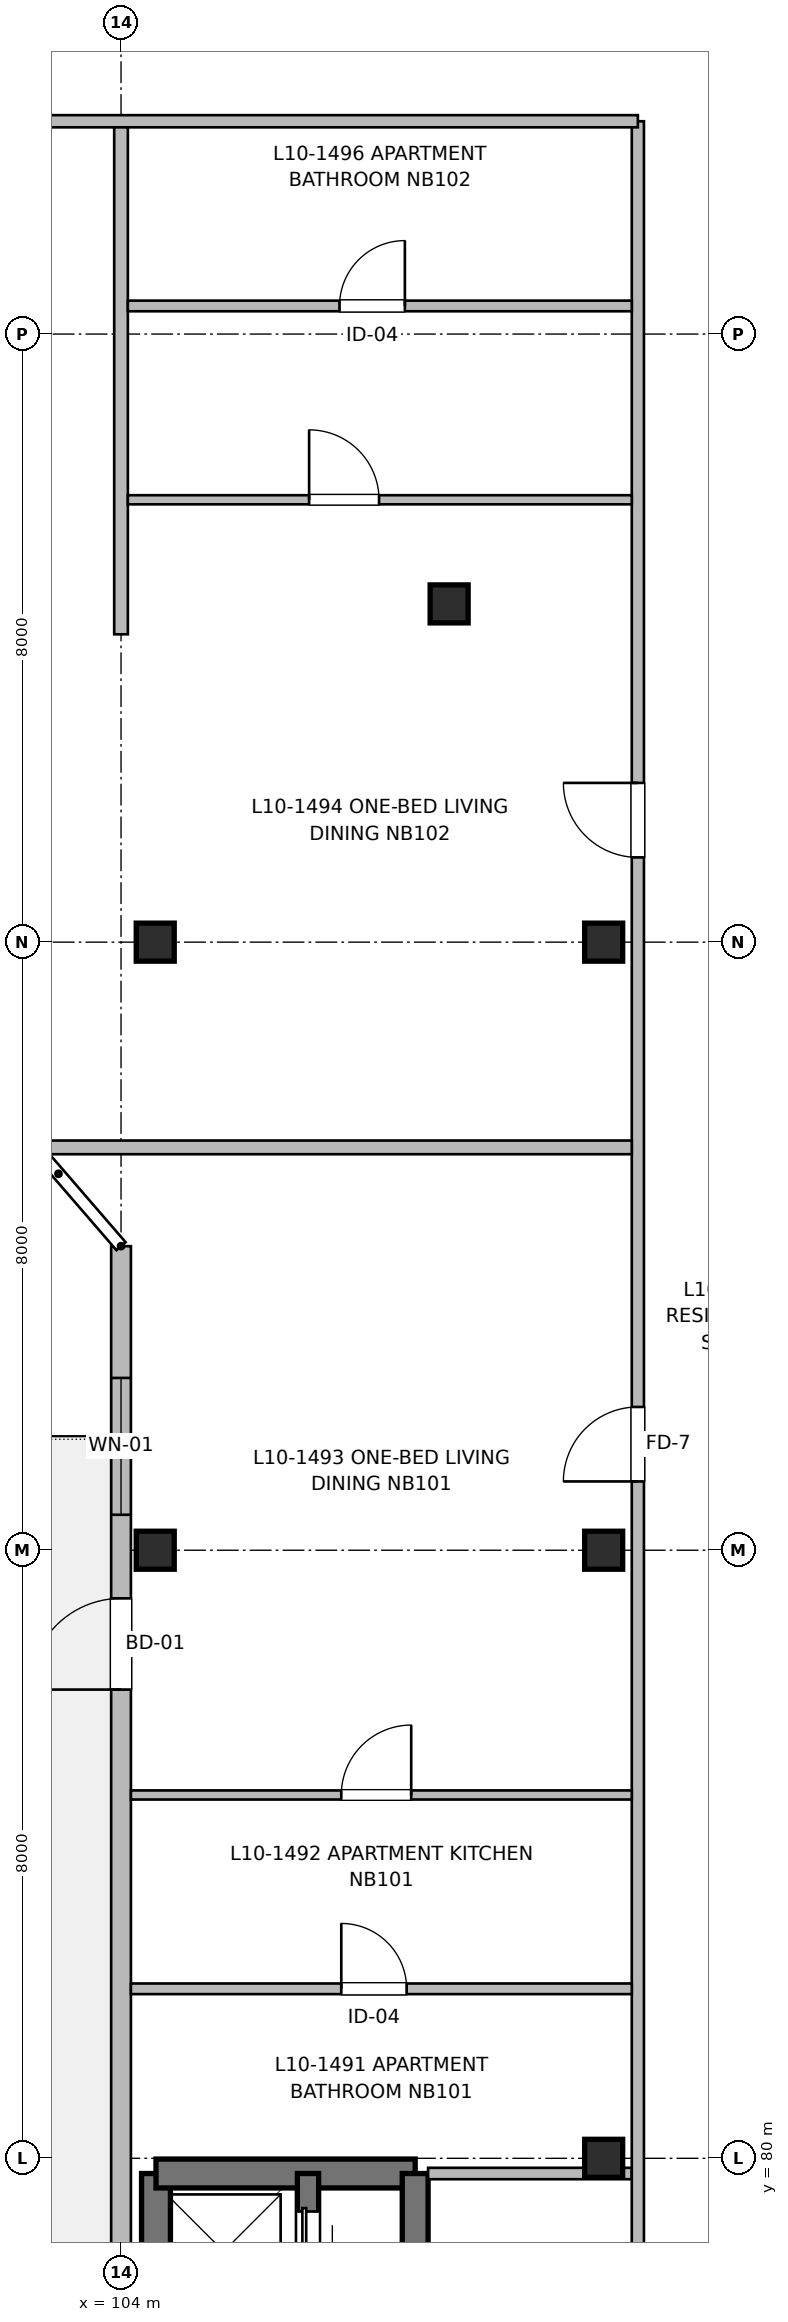
"""IFC4 building model, lengths in metres.
Left out: names, types, materials, properties, quantities, classifications, styles, units other than length and angle.
Written with IfcOpenShell. Run it as: python <this file> out.ifc"""

import sys

from ifc_helpers import new_model, si_unit, direction, frame, frame_2d, origin, origin_2d, place, context, subcontext, project, spatial, rectangle, extrude, element, fill, save


model = new_model("IFC4")
c1 = context("Model", 3, precision=1e-05, world=origin(), true_north=direction((0.0, 1.0)))
c2 = subcontext(c1, "Body", "Model", "MODEL_VIEW")
j1 = project(units=[si_unit("LENGTHUNIT", "METRE"), si_unit("PLANEANGLEUNIT", "RADIAN")], contexts=[c1])
p1 = place(None, origin())
s1 = spatial("IfcSite", under=j1, at=p1, CompositionType="ELEMENT")
p2 = place(p1, origin())
s2 = spatial("IfcBuilding", under=s1, at=p2, CompositionType="ELEMENT")
p3 = place(p2, frame((0.0, 0.0, 32.96)))
s3 = spatial("IfcBuildingStorey", under=s2, at=p3, CompositionType="ELEMENT", Elevation=32.96)
for number, where, z_axis, x_axis in (
    (1, (104.45, 88.0, 0.0), (0.0, 0.0, 1.0), (1.0, 0.0, 0.0)),
    (2, (104.45, 96.0, 0.0), (0.0, 0.0, 1.0), (1.0, 0.0, 0.0)),
    (3, (108.317, 100.45, 0.0), (0.0, 0.0, 1.0), (1.0, 0.0, 0.0)),
    (4, (110.35, 80.0, 0.0), (0.0, 0.0, 1.0), (1.0, 0.0, 0.0)),
    (5, (110.35, 88.0, 0.0), (0.0, 0.0, 1.0), (1.0, 0.0, 0.0)),
    (6, (110.35, 96.0, 0.0), (0.0, 0.0, 1.0), (1.0, 0.0, 0.0)),
):
    element("IfcColumn", number, at=place(p3, frame(where, z_axis=z_axis, x_axis=x_axis)), inside=s3, PredefinedType="COLUMN", context=c2, shape_type="SweptSolid", body=[
        extrude(rectangle(XDim=0.5, YDim=0.5, at=origin_2d()), origin(), (0.0, 0.0, 1.0), 3.2),
    ])
p4 = place(p3, frame((104.46, 67.35, 0.0), z_axis=(0.0, 0.0, 1.0), x_axis=(0.0, 1.0, 0.0)))
e7 = element("IfcWall", 7, at=p4, inside=s3, PredefinedType="SHEAR", context=c2, shape_type="SweptSolid", body=[
    extrude(rectangle(XDim=12.45, YDim=0.38, at=frame_2d((6.225, 0.0))), origin(), (0.0, 0.0, 1.0), 3.2),
])
p5 = place(p4, frame((2.2, 0.0, 0.97)))
e8 = element("IfcOpeningElement", 8, at=p5, cuts=e7, PredefinedType="OPENING", context=c2, shape_type="SweptSolid", body=[
    extrude(rectangle(XDim=0.95, YDim=1.25, at=frame_2d((0.475, 0.625))), frame((0.0, 0.2, 0.0), z_axis=(0.0, -1.0, 0.0), x_axis=(1.0, 0.0, 0.0)), (0.0, 0.0, 1.0), 0.4),
])
p6 = place(p3, frame((104.46, 79.8, 0.0), z_axis=(0.0, 0.0, 1.0), x_axis=(1.0, 0.0, 0.0)))
e9 = element("IfcWall", 9, at=p6, inside=s3, PredefinedType="SHEAR", context=c2, shape_type="SweptSolid", body=[
    extrude(rectangle(XDim=3.41, YDim=0.38, at=frame_2d((1.705, 0.0))), origin(), (0.0, 0.0, 1.0), 3.2),
])
p7 = place(p3, frame((107.87, 79.8, 0.0), z_axis=(0.0, 0.0, 1.0), x_axis=(0.0, -1.0, 0.0)))
e10 = element("IfcWall", 10, at=p7, inside=s3, PredefinedType="SHEAR", context=c2, shape_type="SweptSolid", body=[
    extrude(rectangle(XDim=12.45, YDim=0.34, at=frame_2d((6.225, 0.0))), origin(), (0.0, 0.0, 1.0), 3.2),
])
p8 = place(p7, frame((10.85, 0.0, 0.0)))
e11 = element("IfcOpeningElement", 11, at=p8, cuts=e10, PredefinedType="OPENING", context=c2, shape_type="SweptSolid", body=[
    extrude(rectangle(XDim=1.05, YDim=2.15, at=frame_2d((0.525, 1.075))), frame((0.0, 0.18, 0.0), z_axis=(0.0, -1.0, 0.0), x_axis=(1.0, 0.0, 0.0)), (0.0, 0.0, 1.0), 0.36),
])
p9 = place(p3, frame((106.46, 74.55, 0.0), z_axis=(0.0, 0.0, 1.0), x_axis=(0.0, 1.0, 0.0)))
e12 = element("IfcWall", 12, at=p9, inside=s3, PredefinedType="SHEAR", context=c2, shape_type="SweptSolid", body=[
    extrude(rectangle(XDim=5.25, YDim=0.28, at=frame_2d((2.625, 0.0))), origin(), (0.0, 0.0, 1.0), 3.2),
])
p10 = place(p9, frame((1.15, 0.0, 0.0)))
e13 = element("IfcOpeningElement", 13, at=p10, cuts=e12, PredefinedType="OPENING", context=c2, shape_type="SweptSolid", body=[
    extrude(rectangle(XDim=1.0, YDim=2.15, at=frame_2d((0.5, 1.075))), frame((0.0, 0.15, 0.0), z_axis=(0.0, -1.0, 0.0), x_axis=(1.0, 0.0, 0.0)), (0.0, 0.0, 1.0), 0.3),
])
p11 = place(p9, frame((3.85, 0.0, 0.0)))
e14 = element("IfcOpeningElement", 14, at=p11, cuts=e12, PredefinedType="OPENING", context=c2, shape_type="SweptSolid", body=[
    extrude(rectangle(XDim=0.9, YDim=2.15, at=frame_2d((0.45, 1.075))), frame((0.0, 0.15, 0.0), z_axis=(0.0, -1.0, 0.0), x_axis=(1.0, 0.0, 0.0)), (0.0, 0.0, 1.0), 0.3),
])
p12 = place(p3, frame((104.0, 63.0, 0.0), z_axis=(0.0, 0.0, 1.0), x_axis=(0.0, 1.0, 0.0)))
e15 = element("IfcWall", 15, at=p12, inside=s3, PredefinedType="SOLIDWALL", context=c2, shape_type="SweptSolid", body=[
    extrude(rectangle(XDim=29.0, YDim=0.26, at=frame_2d((14.5, 0.0))), origin(), (0.0, 0.0, 1.0), 2.98),
])
p13 = place(p12, frame((4.583, 0.0, 0.87)))
e16 = element("IfcOpeningElement", 16, at=p13, cuts=e15, PredefinedType="OPENING", context=c2, shape_type="SweptSolid", body=[
    extrude(rectangle(XDim=1.4, YDim=1.35, at=frame_2d((0.7, 0.675))), frame((0.0, 0.14, 0.0), z_axis=(0.0, -1.0, 0.0), x_axis=(1.0, 0.0, 0.0)), (0.0, 0.0, 1.0), 0.28),
])
p14 = place(p12, frame((13.025, 0.0, 0.87)))
e17 = element("IfcOpeningElement", 17, at=p14, cuts=e15, PredefinedType="OPENING", context=c2, shape_type="SweptSolid", body=[
    extrude(rectangle(XDim=1.25, YDim=1.35, at=frame_2d((0.625, 0.675))), frame((0.0, 0.14, 0.0), z_axis=(0.0, -1.0, 0.0), x_axis=(1.0, 0.0, 0.0)), (0.0, 0.0, 1.0), 0.28),
])
p15 = place(p12, frame((23.167, 0.0, 0.0)))
e18 = element("IfcOpeningElement", 18, at=p15, cuts=e15, PredefinedType="OPENING", context=c2, shape_type="SweptSolid", body=[
    extrude(rectangle(XDim=1.2, YDim=2.2, at=frame_2d((0.6, 1.1))), frame((0.0, 0.14, 0.0), z_axis=(0.0, -1.0, 0.0), x_axis=(1.0, 0.0, 0.0)), (0.0, 0.0, 1.0), 0.28),
])
p16 = place(p12, frame((25.467, 0.0, 0.72)))
e19 = element("IfcOpeningElement", 19, at=p16, cuts=e15, PredefinedType="OPENING", context=c2, shape_type="SweptSolid", body=[
    extrude(rectangle(XDim=1.8, YDim=1.5, at=frame_2d((0.9, 0.75))), frame((0.0, 0.14, 0.0), z_axis=(0.0, -1.0, 0.0), x_axis=(1.0, 0.0, 0.0)), (0.0, 0.0, 1.0), 0.28),
])
p17 = place(p3, frame((108.04, 79.8, 0.0), z_axis=(0.0, 0.0, 1.0), x_axis=(1.0, 0.0, 0.0)))
e20 = element("IfcWall", 20, at=p17, inside=s3, PredefinedType="PARTITIONING", context=c2, shape_type="SweptSolid", body=[
    extrude(rectangle(XDim=2.68, YDim=0.15, at=frame_2d((1.34, 0.0))), origin(), (0.0, 0.0, 1.0), 2.935),
])
p18 = place(p3, frame((110.8, 63.16, 0.0), z_axis=(0.0, 0.0, 1.0), x_axis=(0.0, 1.0, 0.0)))
e21 = element("IfcWall", 21, at=p18, inside=s3, PredefinedType="PARTITIONING", context=c2, shape_type="SweptSolid", body=[
    extrude(rectangle(XDim=43.64, YDim=0.16, at=frame_2d((21.82, 0.0))), origin(), (0.0, 0.0, 1.0), 2.935),
])
p19 = place(p18, frame((5.84, 0.0, 0.0)))
e22 = element("IfcOpeningElement", 22, at=p19, cuts=e21, PredefinedType="OPENING", context=c2, shape_type="SweptSolid", body=[
    extrude(rectangle(XDim=1.1, YDim=2.15, at=frame_2d((0.55, 1.075))), frame((0.0, 0.09, 0.0), z_axis=(0.0, -1.0, 0.0), x_axis=(1.0, 0.0, 0.0)), (0.0, 0.0, 1.0), 0.18),
])
p20 = place(p18, frame((12.24, 0.0, 0.0)))
e23 = element("IfcOpeningElement", 23, at=p20, cuts=e21, PredefinedType="OPENING", context=c2, shape_type="SweptSolid", body=[
    extrude(rectangle(XDim=1.6, YDim=2.15, at=frame_2d((0.8, 1.075))), frame((0.0, 0.09, 0.0), z_axis=(0.0, -1.0, 0.0), x_axis=(1.0, 0.0, 0.0)), (0.0, 0.0, 1.0), 0.18),
])
p21 = place(p18, frame((1.8, 0.0, 0.0)))
e24 = element("IfcOpeningElement", 24, at=p21, cuts=e21, PredefinedType="OPENING", context=c2, shape_type="SweptSolid", body=[
    extrude(rectangle(XDim=0.96, YDim=2.15, at=frame_2d((0.48, 1.075))), frame((0.0, 0.09, 0.0), z_axis=(0.0, -1.0, 0.0), x_axis=(1.0, 0.0, 0.0)), (0.0, 0.0, 1.0), 0.18),
])
p22 = place(p18, frame((25.745, 0.0, 0.0)))
e25 = element("IfcOpeningElement", 25, at=p22, cuts=e21, PredefinedType="OPENING", context=c2, shape_type="SweptSolid", body=[
    extrude(rectangle(XDim=0.98, YDim=2.15, at=frame_2d((0.49, 1.075))), frame((0.0, 0.09, 0.0), z_axis=(0.0, -1.0, 0.0), x_axis=(1.0, 0.0, 0.0)), (0.0, 0.0, 1.0), 0.18),
])
p23 = place(p18, frame((33.955, 0.0, 0.0)))
e26 = element("IfcOpeningElement", 26, at=p23, cuts=e21, PredefinedType="OPENING", context=c2, shape_type="SweptSolid", body=[
    extrude(rectangle(XDim=0.98, YDim=2.15, at=frame_2d((0.49, 1.075))), frame((0.0, 0.09, 0.0), z_axis=(0.0, -1.0, 0.0), x_axis=(1.0, 0.0, 0.0)), (0.0, 0.0, 1.0), 0.18),
])
p24 = place(p3, frame((93.66, 106.8, 0.0), z_axis=(0.0, 0.0, 1.0), x_axis=(1.0, 0.0, 0.0)))
e27 = element("IfcWall", 27, at=p24, inside=s3, PredefinedType="PARTITIONING", context=c2, shape_type="SweptSolid", body=[
    extrude(rectangle(XDim=17.14, YDim=0.16, at=frame_2d((8.57, 0.0))), origin(), (0.0, 0.0, 1.0), 2.935),
])
p25 = place(p3, frame((104.0, 100.05, 0.0), z_axis=(0.0, 0.0, 1.0), x_axis=(0.0, 1.0, 0.0)))
e28 = element("IfcWall", 28, at=p25, inside=s3, PredefinedType="PARTITIONING", context=c2, shape_type="SweptSolid", body=[
    extrude(rectangle(XDim=6.67, YDim=0.18, at=frame_2d((3.335, 0.0))), origin(), (0.0, 0.0, 1.0), 2.935),
])
p26 = place(p3, frame((102.929, 93.3, 0.0), z_axis=(0.0, 0.0, 1.0), x_axis=(1.0, 0.0, 0.0)))
e29 = element("IfcWall", 29, at=p26, inside=s3, PredefinedType="PARTITIONING", context=c2, shape_type="SweptSolid", body=[
    extrude(rectangle(XDim=7.791, YDim=0.18, at=frame_2d((3.895, 0.0))), origin(), (0.0, 0.0, 1.0), 2.935),
])
p27 = place(p3, frame((104.13, 82.23, 0.0), z_axis=(0.0, 0.0, 1.0), x_axis=(1.0, 0.0, 0.0)))
e30 = element("IfcWall", 30, at=p27, inside=s3, PredefinedType="PARTITIONING", context=c2, shape_type="SweptSolid", body=[
    extrude(rectangle(XDim=6.59, YDim=0.14, at=frame_2d((3.295, 0.0))), origin(), (0.0, 0.0, 1.0), 2.935),
])
p28 = place(p27, frame((2.768, 0.0, 0.0)))
e31 = element("IfcOpeningElement", 31, at=p28, cuts=e30, PredefinedType="OPENING", context=c2, shape_type="SweptSolid", body=[
    extrude(rectangle(XDim=0.86, YDim=2.1, at=frame_2d((0.43, 1.05))), frame((0.0, 0.08, 0.0), z_axis=(0.0, -1.0, 0.0), x_axis=(1.0, 0.0, 0.0)), (0.0, 0.0, 1.0), 0.16),
])
p29 = place(p3, frame((104.13, 84.78, 0.0), z_axis=(0.0, 0.0, 1.0), x_axis=(1.0, 0.0, 0.0)))
e32 = element("IfcWall", 32, at=p29, inside=s3, PredefinedType="PARTITIONING", context=c2, shape_type="SweptSolid", body=[
    extrude(rectangle(XDim=6.59, YDim=0.12, at=frame_2d((3.295, 0.0))), origin(), (0.0, 0.0, 1.0), 2.935),
])
p30 = place(p29, frame((2.768, 0.0, 0.0)))
e33 = element("IfcOpeningElement", 33, at=p30, cuts=e32, PredefinedType="OPENING", context=c2, shape_type="SweptSolid", body=[
    extrude(rectangle(XDim=0.92, YDim=2.1, at=frame_2d((0.46, 1.05))), frame((0.0, 0.07, 0.0), z_axis=(0.0, -1.0, 0.0), x_axis=(1.0, 0.0, 0.0)), (0.0, 0.0, 1.0), 0.14),
])
p31 = place(p3, frame((104.09, 101.82, 0.0), z_axis=(0.0, 0.0, 1.0), x_axis=(1.0, 0.0, 0.0)))
e34 = element("IfcWall", 34, at=p31, inside=s3, PredefinedType="PARTITIONING", context=c2, shape_type="SweptSolid", body=[
    extrude(rectangle(XDim=6.63, YDim=0.12, at=frame_2d((3.315, 0.0))), origin(), (0.0, 0.0, 1.0), 2.935),
])
p32 = place(p31, frame((2.385, 0.0, 0.0)))
e35 = element("IfcOpeningElement", 35, at=p32, cuts=e34, PredefinedType="OPENING", context=c2, shape_type="SweptSolid", body=[
    extrude(rectangle(XDim=0.92, YDim=2.1, at=frame_2d((0.46, 1.05))), frame((0.0, 0.07, 0.0), z_axis=(0.0, -1.0, 0.0), x_axis=(1.0, 0.0, 0.0)), (0.0, 0.0, 1.0), 0.14),
])
p33 = place(p3, frame((104.09, 104.37, 0.0), z_axis=(0.0, 0.0, 1.0), x_axis=(1.0, 0.0, 0.0)))
e36 = element("IfcWall", 36, at=p33, inside=s3, PredefinedType="PARTITIONING", context=c2, shape_type="SweptSolid", body=[
    extrude(rectangle(XDim=6.63, YDim=0.14, at=frame_2d((3.315, 0.0))), origin(), (0.0, 0.0, 1.0), 2.935),
])
p34 = place(p33, frame((2.785, 0.0, 0.0)))
e37 = element("IfcOpeningElement", 37, at=p34, cuts=e36, PredefinedType="OPENING", context=c2, shape_type="SweptSolid", body=[
    extrude(rectangle(XDim=0.86, YDim=2.1, at=frame_2d((0.43, 1.05))), frame((0.0, 0.08, 0.0), z_axis=(0.0, -1.0, 0.0), x_axis=(1.0, 0.0, 0.0)), (0.0, 0.0, 1.0), 0.16),
])
p35 = place(p11, origin())
e38 = element("IfcDoor", 38, at=p35, inside=s3, OperationType="SLIDING_TO_RIGHT", PredefinedType="DOOR", context=c2, shape_type="SweptSolid", body=[
    extrude(rectangle(XDim=0.9, YDim=2.15, at=frame_2d((0.45, 1.075))), frame((0.0, 0.025, 0.0), z_axis=(0.0, -1.0, 0.0), x_axis=(1.0, 0.0, 0.0)), (0.0, 0.0, 1.0), 0.05),
])
fill(e14, e38)
p36 = place(p15, origin())
e39 = element("IfcDoor", 39, at=p36, inside=s3, OperationType="SINGLE_SWING_LEFT", PredefinedType="DOOR", context=c2, shape_type="SweptSolid", body=[
    extrude(rectangle(XDim=1.2, YDim=2.2, at=frame_2d((0.6, 1.1))), frame((0.0, 0.025, 0.0), z_axis=(0.0, -1.0, 0.0), x_axis=(1.0, 0.0, 0.0)), (0.0, 0.0, 1.0), 0.05),
])
fill(e18, e39)
p37 = place(p16, origin())
e40 = element("IfcWindow", 40, at=p37, inside=s3, PartitioningType="SINGLE_PANEL", PredefinedType="WINDOW", context=c2, shape_type="SweptSolid", body=[
    extrude(rectangle(XDim=1.8, YDim=1.5, at=frame_2d((0.9, 0.75))), frame((0.0, 0.03, 0.0), z_axis=(0.0, -1.0, 0.0), x_axis=(1.0, 0.0, 0.0)), (0.0, 0.0, 1.0), 0.06),
])
fill(e19, e40)
p38 = place(p28, origin())
e41 = element("IfcDoor", 41, at=p38, inside=s3, OperationType="SINGLE_SWING_LEFT", PredefinedType="DOOR", context=c2, shape_type="SweptSolid", body=[
    extrude(rectangle(XDim=0.86, YDim=2.1, at=frame_2d((0.43, 1.05))), frame((0.0, 0.025, 0.0), z_axis=(0.0, -1.0, 0.0), x_axis=(1.0, 0.0, 0.0)), (0.0, 0.0, 1.0), 0.05),
])
fill(e31, e41)
p39 = place(p30, origin())
e42 = element("IfcDoor", 42, at=p39, inside=s3, OperationType="SINGLE_SWING_RIGHT", PredefinedType="DOOR", context=c2, shape_type="SweptSolid", body=[
    extrude(rectangle(XDim=0.92, YDim=2.1, at=frame_2d((0.46, 1.05))), frame((0.0, 0.025, 0.0), z_axis=(0.0, -1.0, 0.0), x_axis=(1.0, 0.0, 0.0)), (0.0, 0.0, 1.0), 0.05),
])
fill(e33, e42)
p40 = place(p22, origin())
e43 = element("IfcDoor", 43, at=p40, inside=s3, OperationType="SINGLE_SWING_LEFT", PredefinedType="DOOR", context=c2, shape_type="SweptSolid", body=[
    extrude(rectangle(XDim=0.98, YDim=2.15, at=frame_2d((0.49, 1.075))), frame((0.0, 0.025, 0.0), z_axis=(0.0, -1.0, 0.0), x_axis=(1.0, 0.0, 0.0)), (0.0, 0.0, 1.0), 0.05),
])
fill(e25, e43)
p41 = place(p34, origin())
e44 = element("IfcDoor", 44, at=p41, inside=s3, OperationType="SINGLE_SWING_RIGHT", PredefinedType="DOOR", context=c2, shape_type="SweptSolid", body=[
    extrude(rectangle(XDim=0.86, YDim=2.1, at=frame_2d((0.43, 1.05))), frame((0.0, 0.025, 0.0), z_axis=(0.0, -1.0, 0.0), x_axis=(1.0, 0.0, 0.0)), (0.0, 0.0, 1.0), 0.05),
])
fill(e37, e44)
p42 = place(p32, origin())
e45 = element("IfcDoor", 45, at=p42, inside=s3, OperationType="SINGLE_SWING_LEFT", PredefinedType="DOOR", context=c2, shape_type="SweptSolid", body=[
    extrude(rectangle(XDim=0.92, YDim=2.1, at=frame_2d((0.46, 1.05))), frame((0.0, 0.025, 0.0), z_axis=(0.0, -1.0, 0.0), x_axis=(1.0, 0.0, 0.0)), (0.0, 0.0, 1.0), 0.05),
])
fill(e35, e45)
p43 = place(p23, origin())
e46 = element("IfcDoor", 46, at=p43, inside=s3, OperationType="SINGLE_SWING_RIGHT", PredefinedType="DOOR", context=c2, shape_type="SweptSolid", body=[
    extrude(rectangle(XDim=0.98, YDim=2.15, at=frame_2d((0.49, 1.075))), frame((0.0, 0.025, 0.0), z_axis=(0.0, -1.0, 0.0), x_axis=(1.0, 0.0, 0.0)), (0.0, 0.0, 1.0), 0.05),
])
fill(e26, e46)
save(model, sys.argv[1])
